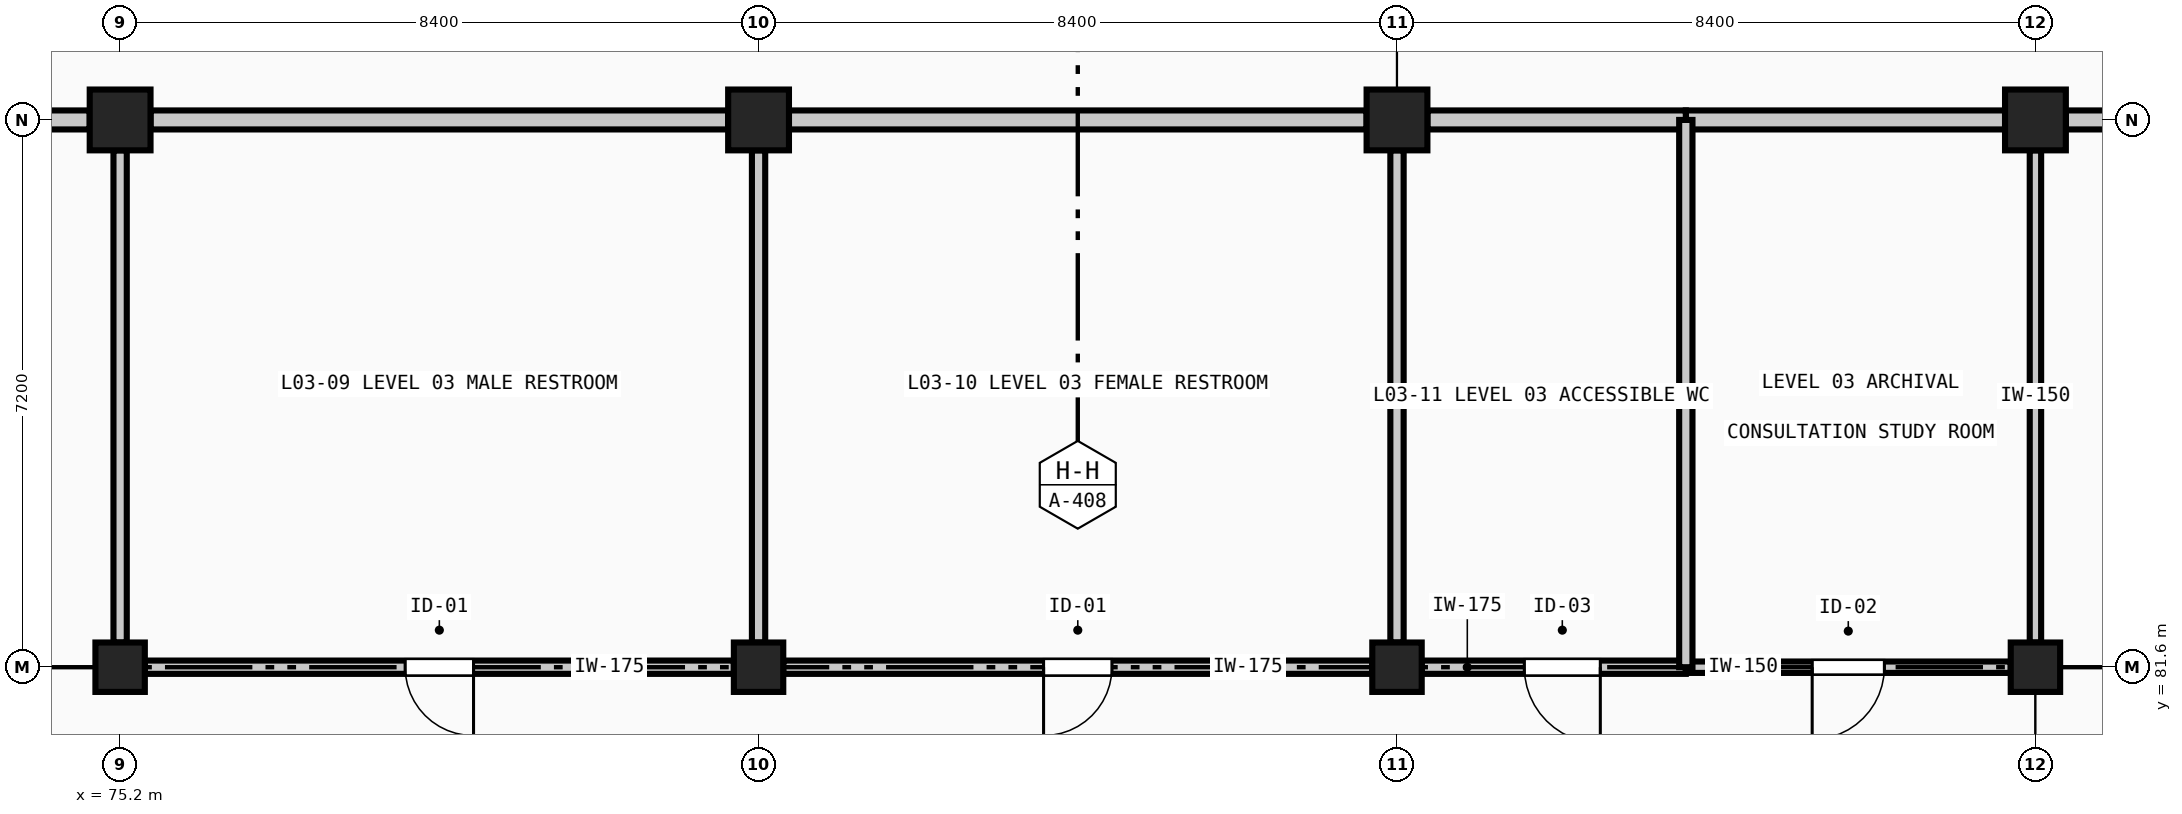
"""IFC4 building model, lengths in metres.
Left out: names, types, materials, properties, quantities, classifications, styles, units other than length and angle.
Written with IfcOpenShell. Run it as: python <this file> out.ifc"""

import sys

from ifc_helpers import new_model, si_unit, direction, frame, frame_2d, origin, origin_2d, place, context, subcontext, project, spatial, rectangle, extrude, element, fill, save


model = new_model("IFC4")
c1 = context("Model", 3, precision=1e-05, world=origin(), true_north=direction((0.0, 1.0)))
c2 = subcontext(c1, "Body", "Model", "MODEL_VIEW")
j1 = project(units=[si_unit("LENGTHUNIT", "METRE"), si_unit("PLANEANGLEUNIT", "RADIAN")], contexts=[c1])
p1 = place(None, origin())
s1 = spatial("IfcSite", under=j1, at=p1, CompositionType="ELEMENT")
p2 = place(p1, origin())
s2 = spatial("IfcBuilding", under=s1, at=p2, CompositionType="ELEMENT")
p3 = place(p2, frame((0.0, 0.0, 14.4)))
s3 = spatial("IfcBuildingStorey", under=s2, at=p3, CompositionType="ELEMENT", Elevation=14.4)
p4 = place(p3, frame((75.2, 81.6, 0.0), z_axis=(0.0, 0.0, 1.0), x_axis=(1.0, 0.0, 0.0)))
e1 = element("IfcColumn", 1, at=p4, inside=s3, PredefinedType="COLUMN", context=c2, shape_type="SweptSolid", body=[
    extrude(rectangle(XDim=0.65, YDim=0.65, at=origin_2d()), origin(), (0.0, 0.0, 1.0), 4.48),
])
p5 = place(p3, frame((75.2, 88.8, 0.0), z_axis=(0.0, 0.0, 1.0), x_axis=(1.0, 0.0, 0.0)))
e2 = element("IfcColumn", 2, at=p5, inside=s3, PredefinedType="COLUMN", context=c2, shape_type="SweptSolid", body=[
    extrude(rectangle(XDim=0.8, YDim=0.8, at=origin_2d()), origin(), (0.0, 0.0, 1.0), 4.48),
])
p6 = place(p3, frame((83.6, 81.6, 0.0), z_axis=(0.0, 0.0, 1.0), x_axis=(1.0, 0.0, 0.0)))
e3 = element("IfcColumn", 3, at=p6, inside=s3, PredefinedType="COLUMN", context=c2, shape_type="SweptSolid", body=[
    extrude(rectangle(XDim=0.65, YDim=0.65, at=origin_2d()), origin(), (0.0, 0.0, 1.0), 4.48),
])
p7 = place(p3, frame((83.6, 88.8, 0.0), z_axis=(0.0, 0.0, 1.0), x_axis=(1.0, 0.0, 0.0)))
e4 = element("IfcColumn", 4, at=p7, inside=s3, PredefinedType="COLUMN", context=c2, shape_type="SweptSolid", body=[
    extrude(rectangle(XDim=0.8, YDim=0.8, at=origin_2d()), origin(), (0.0, 0.0, 1.0), 4.48),
])
p8 = place(p3, frame((92.0, 81.6, 0.0), z_axis=(0.0, 0.0, 1.0), x_axis=(1.0, 0.0, 0.0)))
e5 = element("IfcColumn", 5, at=p8, inside=s3, PredefinedType="COLUMN", context=c2, shape_type="SweptSolid", body=[
    extrude(rectangle(XDim=0.65, YDim=0.65, at=origin_2d()), origin(), (0.0, 0.0, 1.0), 4.48),
])
p9 = place(p3, frame((92.0, 88.8, 0.0), z_axis=(0.0, 0.0, 1.0), x_axis=(1.0, 0.0, 0.0)))
e6 = element("IfcColumn", 6, at=p9, inside=s3, PredefinedType="COLUMN", context=c2, shape_type="SweptSolid", body=[
    extrude(rectangle(XDim=0.8, YDim=0.8, at=origin_2d()), origin(), (0.0, 0.0, 1.0), 4.48),
])
p10 = place(p3, frame((100.4, 81.6, 0.0), z_axis=(0.0, 0.0, 1.0), x_axis=(1.0, 0.0, 0.0)))
e7 = element("IfcColumn", 7, at=p10, inside=s3, PredefinedType="COLUMN", context=c2, shape_type="SweptSolid", body=[
    extrude(rectangle(XDim=0.65, YDim=0.65, at=origin_2d()), origin(), (0.0, 0.0, 1.0), 4.48),
])
p11 = place(p3, frame((100.4, 88.8, 0.0), z_axis=(0.0, 0.0, 1.0), x_axis=(1.0, 0.0, 0.0)))
e8 = element("IfcColumn", 8, at=p11, inside=s3, PredefinedType="COLUMN", context=c2, shape_type="SweptSolid", body=[
    extrude(rectangle(XDim=0.8, YDim=0.8, at=origin_2d()), origin(), (0.0, 0.0, 1.0), 4.48),
])
p12 = place(p3, frame((83.275, 81.6, 0.0), z_axis=(0.0, 0.0, 1.0), x_axis=(-1.0, 0.0, 0.0)))
e9 = element("IfcWall", 9, at=p12, inside=s3, PredefinedType="PLUMBINGWALL", context=c2, shape_type="SweptSolid", body=[
    extrude(rectangle(XDim=7.75, YDim=0.175, at=frame_2d((3.875, 0.0))), origin(), (0.0, 0.0, 1.0), 3.68),
])
p13 = place(p12, frame((3.425, 0.0, 0.0)))
e10 = element("IfcOpeningElement", 10, at=p13, cuts=e9, PredefinedType="OPENING", context=c2, shape_type="SweptSolid", body=[
    extrude(rectangle(XDim=0.9, YDim=2.1, at=frame_2d((0.45, 1.05))), frame((0.0, 0.097, 0.0), z_axis=(0.0, -1.0, 0.0), x_axis=(1.0, 0.0, 0.0)), (0.0, 0.0, 1.0), 0.195),
])
p14 = place(p3, frame((91.675, 81.6, 0.0), z_axis=(0.0, 0.0, 1.0), x_axis=(-1.0, 0.0, 0.0)))
e11 = element("IfcWall", 11, at=p14, inside=s3, PredefinedType="PLUMBINGWALL", context=c2, shape_type="SweptSolid", body=[
    extrude(rectangle(XDim=7.75, YDim=0.175, at=frame_2d((3.875, 0.0))), origin(), (0.0, 0.0, 1.0), 3.68),
])
p15 = place(p14, frame((3.425, 0.0, 0.0)))
e12 = element("IfcOpeningElement", 12, at=p15, cuts=e11, PredefinedType="OPENING", context=c2, shape_type="SweptSolid", body=[
    extrude(rectangle(XDim=0.9, YDim=2.1, at=frame_2d((0.45, 1.05))), frame((0.0, 0.097, 0.0), z_axis=(0.0, -1.0, 0.0), x_axis=(1.0, 0.0, 0.0)), (0.0, 0.0, 1.0), 0.195),
])
p16 = place(p3, frame((95.8, 81.6, 0.0), z_axis=(0.0, 0.0, 1.0), x_axis=(-1.0, 0.0, 0.0)))
e13 = element("IfcWall", 13, at=p16, inside=s3, PredefinedType="PLUMBINGWALL", context=c2, shape_type="SweptSolid", body=[
    extrude(rectangle(XDim=3.475, YDim=0.175, at=frame_2d((1.738, 0.0))), origin(), (0.0, 0.0, 1.0), 3.68),
])
p17 = place(p16, frame((1.125, 0.0, 0.0)))
e14 = element("IfcOpeningElement", 14, at=p17, cuts=e13, PredefinedType="OPENING", context=c2, shape_type="SweptSolid", body=[
    extrude(rectangle(XDim=1.0, YDim=2.15, at=frame_2d((0.5, 1.075))), frame((0.0, 0.097, 0.0), z_axis=(0.0, -1.0, 0.0), x_axis=(1.0, 0.0, 0.0)), (0.0, 0.0, 1.0), 0.195),
])
p18 = place(p3, frame((100.075, 81.6, 0.0), z_axis=(0.0, 0.0, 1.0), x_axis=(-1.0, 0.0, 0.0)))
e15 = element("IfcWall", 15, at=p18, inside=s3, PredefinedType="PARTITIONING", context=c2, shape_type="SweptSolid", body=[
    extrude(rectangle(XDim=4.275, YDim=0.15, at=frame_2d((2.137, 0.0))), origin(), (0.0, 0.0, 1.0), 3.68),
])
p19 = place(p18, frame((1.663, 0.0, 0.0)))
e16 = element("IfcOpeningElement", 16, at=p19, cuts=e15, PredefinedType="OPENING", context=c2, shape_type="SweptSolid", body=[
    extrude(rectangle(XDim=0.95, YDim=2.15, at=frame_2d((0.475, 1.075))), frame((0.0, 0.085, 0.0), z_axis=(0.0, -1.0, 0.0), x_axis=(1.0, 0.0, 0.0)), (0.0, 0.0, 1.0), 0.17),
])
p20 = place(p3, frame((108.4, 88.8, 0.0), z_axis=(0.0, 0.0, 1.0), x_axis=(-1.0, 0.0, 0.0)))
e17 = element("IfcWall", 17, at=p20, inside=s3, PredefinedType="SOLIDWALL", context=c2, shape_type="SweptSolid", body=[
    extrude(rectangle(XDim=7.6, YDim=0.25, at=frame_2d((3.8, 0.0))), origin(), (0.0, 0.0, 1.0), 3.43),
])
p21 = place(p3, frame((100.0, 88.8, 0.0), z_axis=(0.0, 0.0, 1.0), x_axis=(-1.0, 0.0, 0.0)))
e18 = element("IfcWall", 18, at=p21, inside=s3, PredefinedType="SOLIDWALL", context=c2, shape_type="SweptSolid", body=[
    extrude(rectangle(XDim=4.2, YDim=0.25, at=frame_2d((2.1, 0.0))), origin(), (0.0, 0.0, 1.0), 3.43),
])
p22 = place(p3, frame((95.8, 88.8, 0.0), z_axis=(0.0, 0.0, 1.0), x_axis=(-1.0, 0.0, 0.0)))
e19 = element("IfcWall", 19, at=p22, inside=s3, PredefinedType="SOLIDWALL", context=c2, shape_type="SweptSolid", body=[
    extrude(rectangle(XDim=3.4, YDim=0.25, at=frame_2d((1.7, 0.0))), origin(), (0.0, 0.0, 1.0), 3.43),
])
p23 = place(p3, frame((91.6, 88.8, 0.0), z_axis=(0.0, 0.0, 1.0), x_axis=(-1.0, 0.0, 0.0)))
e20 = element("IfcWall", 20, at=p23, inside=s3, PredefinedType="SOLIDWALL", context=c2, shape_type="SweptSolid", body=[
    extrude(rectangle(XDim=7.6, YDim=0.25, at=frame_2d((3.8, 0.0))), origin(), (0.0, 0.0, 1.0), 3.43),
])
p24 = place(p3, frame((83.2, 88.8, 0.0), z_axis=(0.0, 0.0, 1.0), x_axis=(-1.0, 0.0, 0.0)))
e21 = element("IfcWall", 21, at=p24, inside=s3, PredefinedType="SOLIDWALL", context=c2, shape_type="SweptSolid", body=[
    extrude(rectangle(XDim=7.6, YDim=0.25, at=frame_2d((3.8, 0.0))), origin(), (0.0, 0.0, 1.0), 3.43),
])
p25 = place(p3, frame((74.8, 88.8, 0.0), z_axis=(0.0, 0.0, 1.0), x_axis=(-1.0, 0.0, 0.0)))
e22 = element("IfcWall", 22, at=p25, inside=s3, PredefinedType="SOLIDWALL", context=c2, shape_type="SweptSolid", body=[
    extrude(rectangle(XDim=7.6, YDim=0.25, at=frame_2d((3.8, 0.0))), origin(), (0.0, 0.0, 1.0), 3.43),
])
for number, where, z_axis, x_axis in (
    (23, (75.2, 81.925, 0.0), (0.0, 0.0, 1.0), (0.0, 1.0, 0.0)),
    (24, (83.6, 88.4, 0.0), (0.0, 0.0, 1.0), (0.0, -1.0, 0.0)),
    (25, (92.0, 88.4, 0.0), (0.0, 0.0, 1.0), (0.0, -1.0, 0.0)),
):
    element("IfcWall", number, at=place(p3, frame(where, z_axis=z_axis, x_axis=x_axis)), inside=s3, PredefinedType="PLUMBINGWALL", context=c2, shape_type="SweptSolid", body=[
        extrude(rectangle(XDim=6.475, YDim=0.175, at=frame_2d((3.237, 0.0))), origin(), (0.0, 0.0, 1.0), 3.73),
    ])
p26 = place(p3, frame((95.8, 88.8, 0.0), z_axis=(0.0, 0.0, 1.0), x_axis=(0.0, -1.0, 0.0)))
e26 = element("IfcWall", 26, at=p26, inside=s3, PredefinedType="PLUMBINGWALL", context=c2, shape_type="SweptSolid", body=[
    extrude(rectangle(XDim=7.2, YDim=0.175, at=frame_2d((3.6, 0.0))), origin(), (0.0, 0.0, 1.0), 4.23),
])
p27 = place(p3, frame((100.4, 88.4, 0.0), z_axis=(0.0, 0.0, 1.0), x_axis=(0.0, -1.0, 0.0)))
e27 = element("IfcWall", 27, at=p27, inside=s3, PredefinedType="PARTITIONING", context=c2, shape_type="SweptSolid", body=[
    extrude(rectangle(XDim=6.475, YDim=0.15, at=frame_2d((3.237, 0.0))), origin(), (0.0, 0.0, 1.0), 3.73),
])
p28 = place(p13, origin())
e28 = element("IfcDoor", 28, at=p28, inside=s3, OperationType="SINGLE_SWING_LEFT", PredefinedType="DOOR", context=c2, shape_type="SweptSolid", body=[
    extrude(rectangle(XDim=0.9, YDim=2.1, at=frame_2d((0.45, 1.05))), frame((0.0, 0.025, 0.0), z_axis=(0.0, -1.0, 0.0), x_axis=(1.0, 0.0, 0.0)), (0.0, 0.0, 1.0), 0.05),
])
fill(e10, e28)
p29 = place(p15, origin())
e29 = element("IfcDoor", 29, at=p29, inside=s3, OperationType="SINGLE_SWING_RIGHT", PredefinedType="DOOR", context=c2, shape_type="SweptSolid", body=[
    extrude(rectangle(XDim=0.9, YDim=2.1, at=frame_2d((0.45, 1.05))), frame((0.0, 0.025, 0.0), z_axis=(0.0, -1.0, 0.0), x_axis=(1.0, 0.0, 0.0)), (0.0, 0.0, 1.0), 0.05),
])
fill(e12, e29)
p30 = place(p17, origin())
e30 = element("IfcDoor", 30, at=p30, inside=s3, OperationType="SINGLE_SWING_LEFT", PredefinedType="DOOR", context=c2, shape_type="SweptSolid", body=[
    extrude(rectangle(XDim=1.0, YDim=2.15, at=frame_2d((0.5, 1.075))), frame((0.0, 0.025, 0.0), z_axis=(0.0, -1.0, 0.0), x_axis=(1.0, 0.0, 0.0)), (0.0, 0.0, 1.0), 0.05),
])
fill(e14, e30)
p31 = place(p19, origin())
e31 = element("IfcDoor", 31, at=p31, inside=s3, OperationType="SINGLE_SWING_RIGHT", PredefinedType="DOOR", context=c2, shape_type="SweptSolid", body=[
    extrude(rectangle(XDim=0.95, YDim=2.15, at=frame_2d((0.475, 1.075))), frame((0.0, 0.025, 0.0), z_axis=(0.0, -1.0, 0.0), x_axis=(1.0, 0.0, 0.0)), (0.0, 0.0, 1.0), 0.05),
])
fill(e16, e31)
save(model, sys.argv[1])
